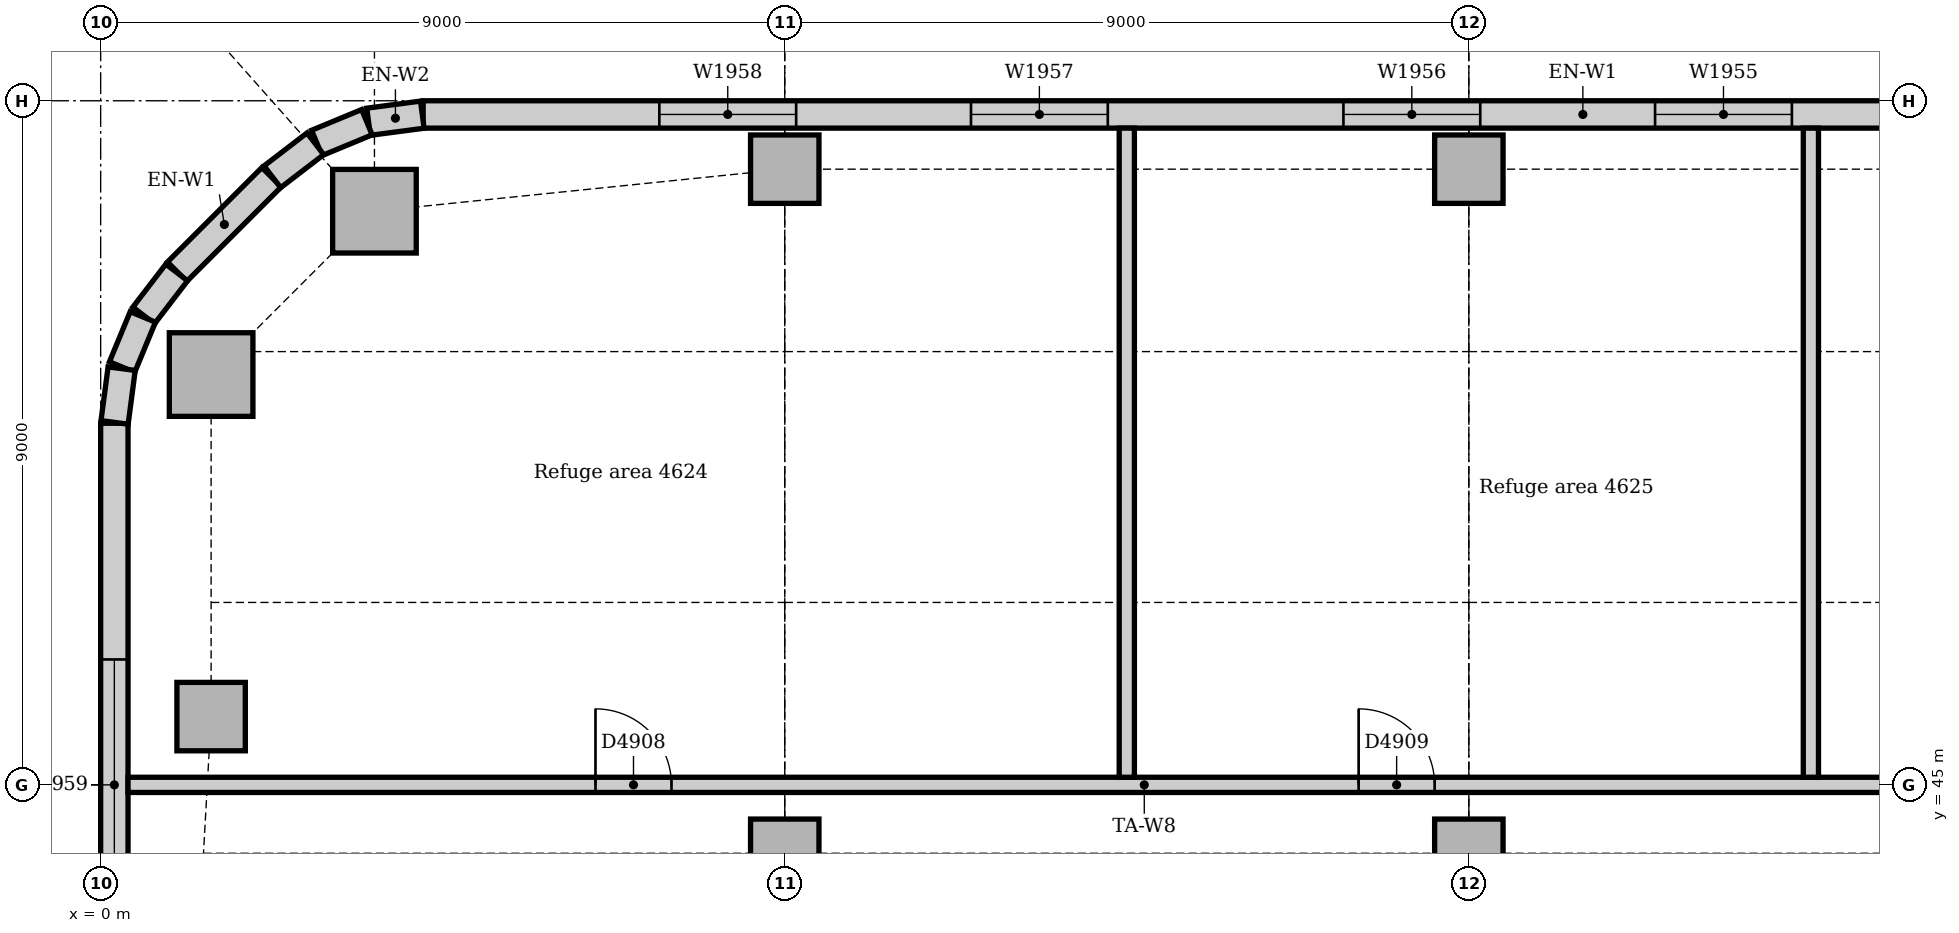
"""IFC4 building model, lengths in metres.
Left out: names, types, materials, properties, quantities, classifications, styles, units other than length and angle.
Written with IfcOpenShell. Run it as: python <this file> out.ifc"""

import sys

from ifc_helpers import new_model, si_unit, direction, frame, frame_2d, origin, origin_2d, place, context, subcontext, project, spatial, rectangle, extrude, element, fill, save


model = new_model("IFC4")
c1 = context("Model", 3, precision=1e-05, world=origin(), true_north=direction((0.0, 1.0)))
c2 = subcontext(c1, "Body", "Model", "MODEL_VIEW")
j1 = project(units=[si_unit("LENGTHUNIT", "METRE"), si_unit("PLANEANGLEUNIT", "RADIAN")], contexts=[c1])
p1 = place(None, origin())
s1 = spatial("IfcSite", under=j1, at=p1, CompositionType="ELEMENT")
p2 = place(p1, origin())
s2 = spatial("IfcBuilding", under=s1, at=p2, CompositionType="ELEMENT")
p3 = place(p2, frame((0.0, 0.0, 193.0)))
s3 = spatial("IfcBuildingStorey", under=s2, at=p3, CompositionType="ELEMENT", Elevation=193.0)
for number, where, z_axis, x_axis in (
    (1, (3.602, 52.547, 0.0), (0.0, 0.0, 1.0), (1.0, 0.0, 0.0)),
    (2, (1.453, 50.398, 0.0), (0.0, 0.0, 1.0), (1.0, 0.0, 0.0)),
):
    element("IfcColumn", number, at=place(p3, frame(where, z_axis=z_axis, x_axis=x_axis)), inside=s3, PredefinedType="COLUMN", context=c2, shape_type="SweptSolid", body=[
        extrude(rectangle(XDim=1.1, YDim=1.1, at=origin_2d()), origin(), (0.0, 0.0, 1.0), 4.85),
    ])
for number, where, z_axis, x_axis in (
    (3, (9.0, 53.1, 0.0), (0.0, 0.0, 1.0), (1.0, 0.0, 0.0)),
    (4, (18.0, 53.1, 0.0), (0.0, 0.0, 1.0), (1.0, 0.0, 0.0)),
    (5, (1.453, 45.898, 0.0), (0.0, 0.0, 1.0), (1.0, 0.0, 0.0)),
    (6, (9.0, 44.1, 0.0), (0.0, 0.0, 1.0), (1.0, 0.0, 0.0)),
    (7, (18.0, 44.1, 0.0), (0.0, 0.0, 1.0), (1.0, 0.0, 0.0)),
):
    element("IfcColumn", number, at=place(p3, frame(where, z_axis=z_axis, x_axis=x_axis)), inside=s3, PredefinedType="COLUMN", context=c2, shape_type="SweptSolid", body=[
        extrude(rectangle(XDim=0.9, YDim=0.9, at=origin_2d()), origin(), (0.0, 0.0, 1.0), 4.85),
    ])
p4 = place(p3, frame((34.757, 53.82, 0.0), z_axis=(0.0, 0.0, 1.0), x_axis=(-1.0, 0.0, 0.0)))
e8 = element("IfcWall", 8, at=p4, inside=s3, PredefinedType="STANDARD", context=c2, shape_type="SweptSolid", body=[
    extrude(rectangle(XDim=30.515, YDim=0.36, at=frame_2d((15.257, 0.0))), origin(), (0.0, 0.0, 1.0), 3.25),
])
p5 = place(p4, frame((3.107, 0.0, 1.2)))
e9 = element("IfcOpeningElement", 9, at=p5, cuts=e8, PredefinedType="OPENING", context=c2, shape_type="SweptSolid", body=[
    extrude(rectangle(XDim=1.8, YDim=1.2, at=frame_2d((0.9, 0.6))), frame((0.0, 0.19, 0.0), z_axis=(0.0, -1.0, 0.0), x_axis=(1.0, 0.0, 0.0)), (0.0, 0.0, 1.0), 0.38),
])
p6 = place(p4, frame((7.607, 0.0, 1.2)))
e10 = element("IfcOpeningElement", 10, at=p6, cuts=e8, PredefinedType="OPENING", context=c2, shape_type="SweptSolid", body=[
    extrude(rectangle(XDim=1.8, YDim=1.2, at=frame_2d((0.9, 0.6))), frame((0.0, 0.19, 0.0), z_axis=(0.0, -1.0, 0.0), x_axis=(1.0, 0.0, 0.0)), (0.0, 0.0, 1.0), 0.38),
])
p7 = place(p4, frame((12.507, 0.0, 1.2)))
e11 = element("IfcOpeningElement", 11, at=p7, cuts=e8, PredefinedType="OPENING", context=c2, shape_type="SweptSolid", body=[
    extrude(rectangle(XDim=1.8, YDim=1.2, at=frame_2d((0.9, 0.6))), frame((0.0, 0.19, 0.0), z_axis=(0.0, -1.0, 0.0), x_axis=(1.0, 0.0, 0.0)), (0.0, 0.0, 1.0), 0.38),
])
p8 = place(p4, frame((16.607, 0.0, 1.2)))
e12 = element("IfcOpeningElement", 12, at=p8, cuts=e8, PredefinedType="OPENING", context=c2, shape_type="SweptSolid", body=[
    extrude(rectangle(XDim=1.8, YDim=1.2, at=frame_2d((0.9, 0.6))), frame((0.0, 0.19, 0.0), z_axis=(0.0, -1.0, 0.0), x_axis=(1.0, 0.0, 0.0)), (0.0, 0.0, 1.0), 0.38),
])
p9 = place(p4, frame((21.507, 0.0, 1.2)))
e13 = element("IfcOpeningElement", 13, at=p9, cuts=e8, PredefinedType="OPENING", context=c2, shape_type="SweptSolid", body=[
    extrude(rectangle(XDim=1.8, YDim=1.2, at=frame_2d((0.9, 0.6))), frame((0.0, 0.19, 0.0), z_axis=(0.0, -1.0, 0.0), x_axis=(1.0, 0.0, 0.0)), (0.0, 0.0, 1.0), 0.38),
])
p10 = place(p4, frame((25.607, 0.0, 1.2)))
e14 = element("IfcOpeningElement", 14, at=p10, cuts=e8, PredefinedType="OPENING", context=c2, shape_type="SweptSolid", body=[
    extrude(rectangle(XDim=1.8, YDim=1.2, at=frame_2d((0.9, 0.6))), frame((0.0, 0.19, 0.0), z_axis=(0.0, -1.0, 0.0), x_axis=(1.0, 0.0, 0.0)), (0.0, 0.0, 1.0), 0.38),
])
p11 = place(p3, frame((2.249, 52.994, 0.0), z_axis=(0.0, 0.0, 1.0), x_axis=(-0.707106781187, -0.707106781187, 0.0)))
e15 = element("IfcWall", 15, at=p11, inside=s3, PredefinedType="STANDARD", context=c2, shape_type="SweptSolid", body=[
    extrude(rectangle(XDim=1.757, YDim=0.36, at=frame_2d((0.879, 0.0))), origin(), (0.0, 0.0, 1.0), 3.25),
])
p12 = place(p3, frame((0.18, 49.757, 0.0), z_axis=(0.0, 0.0, 1.0), x_axis=(0.0, -1.0, 0.0)))
e16 = element("IfcWall", 16, at=p12, inside=s3, PredefinedType="STANDARD", context=c2, shape_type="SweptSolid", body=[
    extrude(rectangle(XDim=7.757, YDim=0.36, at=frame_2d((3.879, 0.0))), origin(), (0.0, 0.0, 1.0), 4.85),
])
p13 = place(p12, frame((3.107, 0.0, 0.9)))
e17 = element("IfcOpeningElement", 17, at=p13, cuts=e16, PredefinedType="OPENING", context=c2, shape_type="SweptSolid", body=[
    extrude(rectangle(XDim=3.3, YDim=2.2, at=frame_2d((1.65, 1.1))), frame((0.0, 0.19, 0.0), z_axis=(0.0, -1.0, 0.0), x_axis=(1.0, 0.0, 0.0)), (0.0, 0.0, 1.0), 0.38),
])
for number, where, z_axis, x_axis in (
    (18, (4.231, 53.817, 0.0), (0.0, 0.0, 1.0), (-0.991, -0.131, 0.0)),
    (19, (3.503, 53.718, 0.0), (0.0, 0.0, 1.0), (-0.924, -0.383, 0.0)),
):
    element("IfcWall", number, at=place(p3, frame(where, z_axis=z_axis, x_axis=x_axis)), inside=s3, PredefinedType="STANDARD", context=c2, shape_type="SweptSolid", body=[
        extrude(rectangle(XDim=0.713, YDim=0.36, at=frame_2d((0.356, 0.0))), origin(), (0.0, 0.0, 1.0), 3.25),
    ])
for number, where, z_axis, x_axis in (
    (20, (2.825, 53.434, 0.0), (0.0, 0.0, 1.0), (-0.793, -0.609, 0.0)),
    (21, (1.0, 51.741, 0.0), (0.0, 0.0, 1.0), (-0.609, -0.793, 0.0)),
):
    element("IfcWall", number, at=place(p3, frame(where, z_axis=z_axis, x_axis=x_axis)), inside=s3, PredefinedType="STANDARD", context=c2, shape_type="SweptSolid", body=[
        extrude(rectangle(XDim=0.713, YDim=0.36, at=frame_2d((0.357, 0.0))), origin(), (0.0, 0.0, 1.0), 3.25),
    ])
for number, where, z_axis, x_axis in (
    (22, (0.555, 51.156, 0.0), (0.0, 0.0, 1.0), (-0.383, -0.924, 0.0)),
    (23, (0.276, 50.476, 0.0), (0.0, 0.0, 1.0), (-0.131, -0.991, 0.0)),
):
    element("IfcWall", number, at=place(p3, frame(where, z_axis=z_axis, x_axis=x_axis)), inside=s3, PredefinedType="STANDARD", context=c2, shape_type="SweptSolid", body=[
        extrude(rectangle(XDim=0.713, YDim=0.36, at=frame_2d((0.356, 0.0))), origin(), (0.0, 0.0, 1.0), 3.25),
    ])
p14 = place(p3, frame((0.36, 45.0, 0.0), z_axis=(0.0, 0.0, 1.0), x_axis=(1.0, 0.0, 0.0)))
e24 = element("IfcWall", 24, at=p14, inside=s3, PredefinedType="PARTITIONING", context=c2, shape_type="SweptSolid", body=[
    extrude(rectangle(XDim=26.74, YDim=0.2, at=frame_2d((13.37, 0.0))), origin(), (0.0, 0.0, 1.0), 4.85),
])
p15 = place(p14, frame((6.15, 0.0, 0.0)))
e25 = element("IfcOpeningElement", 25, at=p15, cuts=e24, PredefinedType="OPENING", context=c2, shape_type="SweptSolid", body=[
    extrude(rectangle(XDim=1.0, YDim=2.1, at=frame_2d((0.5, 1.05))), frame((0.0, 0.11, 0.0), z_axis=(0.0, -1.0, 0.0), x_axis=(1.0, 0.0, 0.0)), (0.0, 0.0, 1.0), 0.22),
])
p16 = place(p14, frame((16.19, 0.0, 0.0)))
e26 = element("IfcOpeningElement", 26, at=p16, cuts=e24, PredefinedType="OPENING", context=c2, shape_type="SweptSolid", body=[
    extrude(rectangle(XDim=1.0, YDim=2.1, at=frame_2d((0.5, 1.05))), frame((0.0, 0.11, 0.0), z_axis=(0.0, -1.0, 0.0), x_axis=(1.0, 0.0, 0.0)), (0.0, 0.0, 1.0), 0.22),
])
p17 = place(p14, frame((23.84, 0.0, 0.0)))
e27 = element("IfcOpeningElement", 27, at=p17, cuts=e24, PredefinedType="OPENING", context=c2, shape_type="SweptSolid", body=[
    extrude(rectangle(XDim=1.0, YDim=2.1, at=frame_2d((0.5, 1.05))), frame((0.0, 0.11, 0.0), z_axis=(0.0, -1.0, 0.0), x_axis=(1.0, 0.0, 0.0)), (0.0, 0.0, 1.0), 0.22),
])
for number, where, z_axis, x_axis in (
    (28, (13.5, 45.1, 0.0), (0.0, 0.0, 1.0), (0.0, 1.0, 0.0)),
    (29, (22.5, 45.1, 0.0), (0.0, 0.0, 1.0), (0.0, 1.0, 0.0)),
):
    element("IfcWall", number, at=place(p3, frame(where, z_axis=z_axis, x_axis=x_axis)), inside=s3, PredefinedType="PARTITIONING", context=c2, shape_type="SweptSolid", body=[
        extrude(rectangle(XDim=8.54, YDim=0.2, at=frame_2d((4.27, 0.0))), origin(), (0.0, 0.0, 1.0), 4.85),
    ])
p18 = place(p7, origin())
e30 = element("IfcWindow", 30, at=p18, inside=s3, PartitioningType="SINGLE_PANEL", PredefinedType="WINDOW", context=c2, shape_type="SweptSolid", body=[
    extrude(rectangle(XDim=1.8, YDim=1.2, at=frame_2d((0.9, 0.6))), frame((0.0, 0.13, 0.0), z_axis=(0.0, -1.0, 0.0), x_axis=(1.0, 0.0, 0.0)), (0.0, 0.0, 1.0), 0.06),
])
fill(e11, e30)
p19 = place(p8, origin())
e31 = element("IfcWindow", 31, at=p19, inside=s3, PartitioningType="SINGLE_PANEL", PredefinedType="WINDOW", context=c2, shape_type="SweptSolid", body=[
    extrude(rectangle(XDim=1.8, YDim=1.2, at=frame_2d((0.9, 0.6))), frame((0.0, 0.13, 0.0), z_axis=(0.0, -1.0, 0.0), x_axis=(1.0, 0.0, 0.0)), (0.0, 0.0, 1.0), 0.06),
])
fill(e12, e31)
p20 = place(p9, origin())
e32 = element("IfcWindow", 32, at=p20, inside=s3, PartitioningType="SINGLE_PANEL", PredefinedType="WINDOW", context=c2, shape_type="SweptSolid", body=[
    extrude(rectangle(XDim=1.8, YDim=1.2, at=frame_2d((0.9, 0.6))), frame((0.0, 0.13, 0.0), z_axis=(0.0, -1.0, 0.0), x_axis=(1.0, 0.0, 0.0)), (0.0, 0.0, 1.0), 0.06),
])
fill(e13, e32)
p21 = place(p10, origin())
e33 = element("IfcWindow", 33, at=p21, inside=s3, PartitioningType="SINGLE_PANEL", PredefinedType="WINDOW", context=c2, shape_type="SweptSolid", body=[
    extrude(rectangle(XDim=1.8, YDim=1.2, at=frame_2d((0.9, 0.6))), frame((0.0, 0.13, 0.0), z_axis=(0.0, -1.0, 0.0), x_axis=(1.0, 0.0, 0.0)), (0.0, 0.0, 1.0), 0.06),
])
fill(e14, e33)
p22 = place(p13, origin())
e34 = element("IfcWindow", 34, at=p22, inside=s3, PartitioningType="SINGLE_PANEL", PredefinedType="WINDOW", context=c2, shape_type="SweptSolid", body=[
    extrude(rectangle(XDim=3.3, YDim=2.2, at=frame_2d((1.65, 1.1))), frame((0.0, 0.13, 0.0), z_axis=(0.0, -1.0, 0.0), x_axis=(1.0, 0.0, 0.0)), (0.0, 0.0, 1.0), 0.06),
])
fill(e17, e34)
p23 = place(p15, origin())
e35 = element("IfcDoor", 35, at=p23, inside=s3, OperationType="SINGLE_SWING_LEFT", PredefinedType="DOOR", context=c2, shape_type="SweptSolid", body=[
    extrude(rectangle(XDim=1.0, YDim=2.1, at=frame_2d((0.5, 1.05))), frame((0.0, 0.025, 0.0), z_axis=(0.0, -1.0, 0.0), x_axis=(1.0, 0.0, 0.0)), (0.0, 0.0, 1.0), 0.05),
])
fill(e25, e35)
p24 = place(p16, origin())
e36 = element("IfcDoor", 36, at=p24, inside=s3, OperationType="SINGLE_SWING_LEFT", PredefinedType="DOOR", context=c2, shape_type="SweptSolid", body=[
    extrude(rectangle(XDim=1.0, YDim=2.1, at=frame_2d((0.5, 1.05))), frame((0.0, 0.025, 0.0), z_axis=(0.0, -1.0, 0.0), x_axis=(1.0, 0.0, 0.0)), (0.0, 0.0, 1.0), 0.05),
])
fill(e26, e36)
save(model, sys.argv[1])
